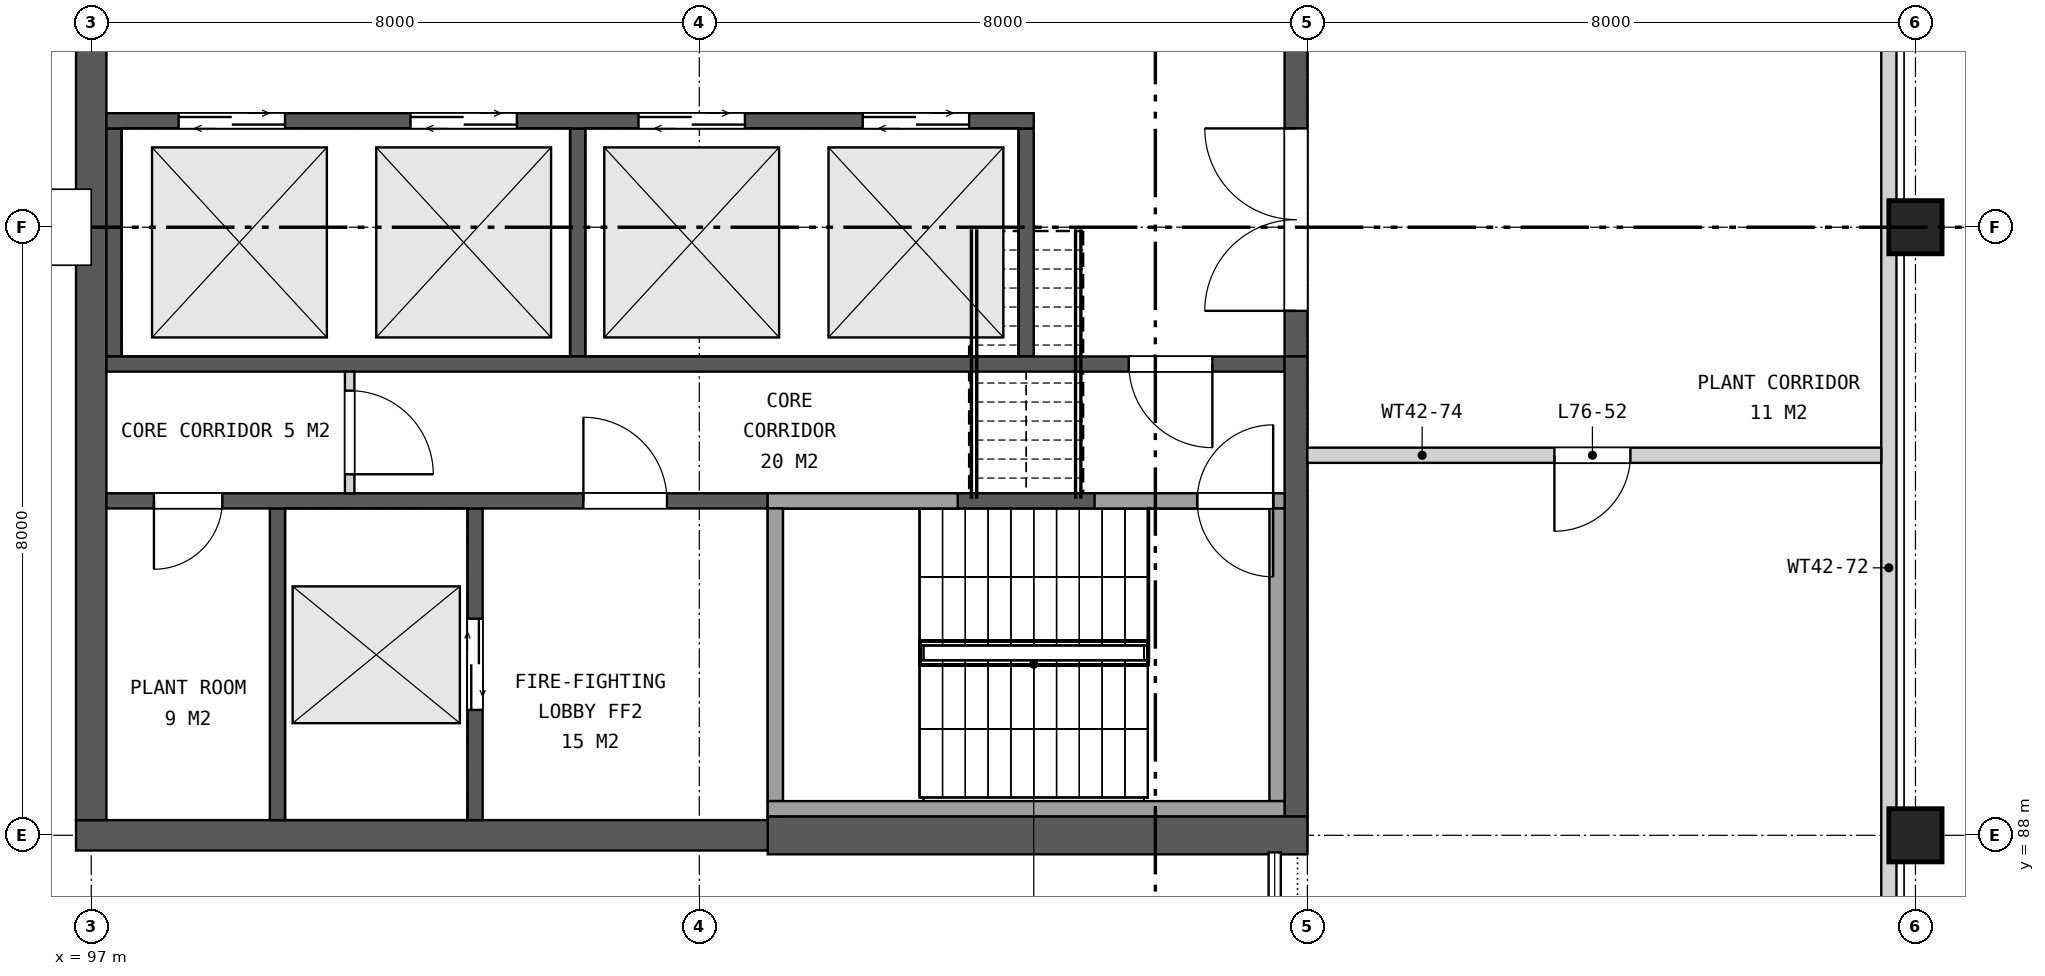
"""IFC4 building model, lengths in metres.
Left out: names, types, materials, properties, quantities, classifications, styles, units other than length and angle.
Written with IfcOpenShell. Run it as: python <this file> out.ifc"""

import sys

from ifc_helpers import new_model, si_unit, direction, frame, frame_2d, origin, origin_2d, place, context, subcontext, project, spatial, rectangle, extrude, element, fill, save


model = new_model("IFC4")
c1 = context("Model", 3, precision=1e-05, world=origin(), true_north=direction((0.0, 1.0)))
c2 = subcontext(c1, "Body", "Model", "MODEL_VIEW")
j1 = project(units=[si_unit("LENGTHUNIT", "METRE"), si_unit("PLANEANGLEUNIT", "RADIAN")], contexts=[c1])
p1 = place(None, origin())
s1 = spatial("IfcSite", under=j1, at=p1, CompositionType="ELEMENT")
p2 = place(p1, origin())
s2 = spatial("IfcBuilding", under=s1, at=p2, CompositionType="ELEMENT")
p3 = place(p2, frame((0.0, 0.0, 349.1)))
s3 = spatial("IfcBuildingStorey", under=s2, at=p3, CompositionType="ELEMENT", Elevation=349.1)
for number, where, z_axis, x_axis in (
    (1, (121.0, 88.0, 0.0), (0.0, 0.0, 1.0), (1.0, 0.0, 0.0)),
    (2, (121.0, 96.0, 0.0), (0.0, 0.0, 1.0), (1.0, 0.0, 0.0)),
):
    element("IfcColumn", number, at=place(p3, frame(where, z_axis=z_axis, x_axis=x_axis)), inside=s3, PredefinedType="COLUMN", context=c2, shape_type="SweptSolid", body=[
        extrude(rectangle(XDim=0.7, YDim=0.7, at=origin_2d()), origin(), (0.0, 0.0, 1.0), 10.23),
    ])
p4 = place(p3, frame((113.0, 88.0, 0.0), z_axis=(0.0, 0.0, 1.0), x_axis=(-1.0, 0.0, 0.0)))
e3 = element("IfcWall", 3, at=p4, inside=s3, PredefinedType="SHEAR", context=c2, shape_type="SweptSolid", body=[
    extrude(rectangle(XDim=7.1, YDim=0.5, at=frame_2d((3.55, 0.0))), origin(), (0.0, 0.0, 1.0), 12.0),
])
p5 = place(p3, frame((105.9, 88.0, 0.0), z_axis=(0.0, 0.0, 1.0), x_axis=(-1.0, 0.0, 0.0)))
e4 = element("IfcWall", 4, at=p5, inside=s3, PredefinedType="SHEAR", context=c2, shape_type="SweptSolid", body=[
    extrude(rectangle(XDim=9.1, YDim=0.4, at=frame_2d((4.55, 0.0))), origin(), (0.0, 0.0, 1.0), 12.0),
])
p6 = place(p3, frame((97.0, 111.8, 0.0), z_axis=(0.0, 0.0, 1.0), x_axis=(0.0, -1.0, 0.0)))
e5 = element("IfcWall", 5, at=p6, inside=s3, PredefinedType="SHEAR", context=c2, shape_type="SweptSolid", body=[
    extrude(rectangle(XDim=23.6, YDim=0.4, at=frame_2d((11.8, 0.0))), origin(), (0.0, 0.0, 1.0), 12.0),
])
p7 = place(p3, frame((112.85, 105.7, 0.0), z_axis=(0.0, 0.0, 1.0), x_axis=(0.0, -1.0, 0.0)))
e6 = element("IfcWall", 6, at=p7, inside=s3, PredefinedType="SHEAR", context=c2, shape_type="SweptSolid", body=[
    extrude(rectangle(XDim=11.4, YDim=0.3, at=frame_2d((5.7, 0.0))), origin(), (0.0, 0.0, 1.0), 12.0),
])
p8 = place(p7, frame((0.6, 0.0, 0.0)))
e7 = element("IfcOpeningElement", 7, at=p8, cuts=e6, PredefinedType="OPENING", context=c2, shape_type="SweptSolid", body=[
    extrude(rectangle(XDim=2.4, YDim=2.4, at=frame_2d((1.2, 1.2))), frame((0.0, 0.16, 0.0), z_axis=(0.0, -1.0, 0.0), x_axis=(1.0, 0.0, 0.0)), (0.0, 0.0, 1.0), 0.32),
])
p9 = place(p7, frame((4.5, 0.0, 0.0)))
e8 = element("IfcOpeningElement", 8, at=p9, cuts=e6, PredefinedType="OPENING", context=c2, shape_type="SweptSolid", body=[
    extrude(rectangle(XDim=2.4, YDim=2.4, at=frame_2d((1.2, 1.2))), frame((0.0, 0.16, 0.0), z_axis=(0.0, -1.0, 0.0), x_axis=(1.0, 0.0, 0.0)), (0.0, 0.0, 1.0), 0.32),
])
p10 = place(p7, frame((8.4, 0.0, 0.0)))
e9 = element("IfcOpeningElement", 9, at=p10, cuts=e6, PredefinedType="OPENING", context=c2, shape_type="SweptSolid", body=[
    extrude(rectangle(XDim=2.4, YDim=2.4, at=frame_2d((1.2, 1.2))), frame((0.0, 0.16, 0.0), z_axis=(0.0, -1.0, 0.0), x_axis=(1.0, 0.0, 0.0)), (0.0, 0.0, 1.0), 0.32),
])
for number, where, z_axis, x_axis in (
    (10, (109.3, 97.3, 0.0), (0.0, 0.0, 1.0), (0.0, -1.0, 0.0)),
    (11, (103.4, 97.3, 0.0), (0.0, 0.0, 1.0), (0.0, -1.0, 0.0)),
    (12, (97.3, 97.3, 0.0), (0.0, 0.0, 1.0), (0.0, -1.0, 0.0)),
):
    element("IfcWall", number, at=place(p3, frame(where, z_axis=z_axis, x_axis=x_axis)), inside=s3, PredefinedType="SHEAR", context=c2, shape_type="SweptSolid", body=[
        extrude(rectangle(XDim=3.0, YDim=0.2, at=frame_2d((1.5, 0.0))), origin(), (0.0, 0.0, 1.0), 9.2),
    ])
p11 = place(p3, frame((109.4, 97.4, 0.0), z_axis=(0.0, 0.0, 1.0), x_axis=(-1.0, 0.0, 0.0)))
e13 = element("IfcWall", 13, at=p11, inside=s3, PredefinedType="SHEAR", context=c2, shape_type="SweptSolid", body=[
    extrude(rectangle(XDim=12.2, YDim=0.2, at=frame_2d((6.1, 0.0))), origin(), (0.0, 0.0, 1.0), 9.2),
])
p12 = place(p11, frame((0.85, 0.0, 0.0)))
e14 = element("IfcOpeningElement", 14, at=p12, cuts=e13, PredefinedType="OPENING", context=c2, shape_type="SweptSolid", body=[
    extrude(rectangle(XDim=1.4, YDim=2.1, at=frame_2d((0.7, 1.05))), frame((0.0, 0.11, 0.0), z_axis=(0.0, -1.0, 0.0), x_axis=(1.0, 0.0, 0.0)), (0.0, 0.0, 1.0), 0.22),
])
p13 = place(p11, frame((3.8, 0.0, 0.0)))
e15 = element("IfcOpeningElement", 15, at=p13, cuts=e13, PredefinedType="OPENING", context=c2, shape_type="SweptSolid", body=[
    extrude(rectangle(XDim=1.4, YDim=2.1, at=frame_2d((0.7, 1.05))), frame((0.0, 0.11, 0.0), z_axis=(0.0, -1.0, 0.0), x_axis=(1.0, 0.0, 0.0)), (0.0, 0.0, 1.0), 0.22),
])
p14 = place(p11, frame((6.8, 0.0, 0.0)))
e16 = element("IfcOpeningElement", 16, at=p14, cuts=e13, PredefinedType="OPENING", context=c2, shape_type="SweptSolid", body=[
    extrude(rectangle(XDim=1.4, YDim=2.1, at=frame_2d((0.7, 1.05))), frame((0.0, 0.11, 0.0), z_axis=(0.0, -1.0, 0.0), x_axis=(1.0, 0.0, 0.0)), (0.0, 0.0, 1.0), 0.22),
])
p15 = place(p11, frame((9.85, 0.0, 0.0)))
e17 = element("IfcOpeningElement", 17, at=p15, cuts=e13, PredefinedType="OPENING", context=c2, shape_type="SweptSolid", body=[
    extrude(rectangle(XDim=1.4, YDim=2.1, at=frame_2d((0.7, 1.05))), frame((0.0, 0.11, 0.0), z_axis=(0.0, -1.0, 0.0), x_axis=(1.0, 0.0, 0.0)), (0.0, 0.0, 1.0), 0.22),
])
p16 = place(p3, frame((112.7, 94.2, 0.0), z_axis=(0.0, 0.0, 1.0), x_axis=(-1.0, 0.0, 0.0)))
e18 = element("IfcWall", 18, at=p16, inside=s3, PredefinedType="SHEAR", context=c2, shape_type="SweptSolid", body=[
    extrude(rectangle(XDim=15.5, YDim=0.2, at=frame_2d((7.75, 0.0))), origin(), (0.0, 0.0, 1.0), 9.2),
])
p17 = place(p16, frame((0.95, 0.0, 0.0)))
e19 = element("IfcOpeningElement", 19, at=p17, cuts=e18, PredefinedType="OPENING", context=c2, shape_type="SweptSolid", body=[
    extrude(rectangle(XDim=1.1, YDim=2.1, at=frame_2d((0.55, 1.05))), frame((0.0, 0.11, 0.0), z_axis=(0.0, -1.0, 0.0), x_axis=(1.0, 0.0, 0.0)), (0.0, 0.0, 1.0), 0.22),
])
p18 = place(p3, frame((112.85, 94.3, 0.0), z_axis=(0.0, 0.0, 1.0), x_axis=(0.0, -1.0, 0.0)))
e20 = element("IfcWall", 20, at=p18, inside=s3, PredefinedType="SHEAR", context=c2, shape_type="SweptSolid", body=[
    extrude(rectangle(XDim=6.05, YDim=0.3, at=frame_2d((3.025, 0.0))), origin(), (0.0, 0.0, 1.0), 12.0),
])
p19 = place(p3, frame((106.0, 92.3, 0.0), z_axis=(0.0, 0.0, 1.0), x_axis=(0.0, -1.0, 0.0)))
e21 = element("IfcWall", 21, at=p19, inside=s3, PredefinedType="SHEAR", context=c2, shape_type="SweptSolid", body=[
    extrude(rectangle(XDim=4.05, YDim=0.2, at=frame_2d((2.025, 0.0))), origin(), (0.0, 0.0, 1.0), 11.6),
])
p20 = place(p3, frame((102.05, 92.3, 0.0), z_axis=(0.0, 0.0, 1.0), x_axis=(0.0, -1.0, 0.0)))
e22 = element("IfcWall", 22, at=p20, inside=s3, PredefinedType="SHEAR", context=c2, shape_type="SweptSolid", body=[
    extrude(rectangle(XDim=4.1, YDim=0.2, at=frame_2d((2.05, 0.0))), origin(), (0.0, 0.0, 1.0), 9.2),
])
p21 = place(p20, frame((1.45, 0.0, 0.0)))
e23 = element("IfcOpeningElement", 23, at=p21, cuts=e22, PredefinedType="OPENING", context=c2, shape_type="SweptSolid", body=[
    extrude(rectangle(XDim=1.2, YDim=2.1, at=frame_2d((0.6, 1.05))), frame((0.0, 0.11, 0.0), z_axis=(0.0, -1.0, 0.0), x_axis=(1.0, 0.0, 0.0)), (0.0, 0.0, 1.0), 0.22),
])
p22 = place(p3, frame((99.45, 92.3, 0.0), z_axis=(0.0, 0.0, 1.0), x_axis=(0.0, -1.0, 0.0)))
e24 = element("IfcWall", 24, at=p22, inside=s3, PredefinedType="SHEAR", context=c2, shape_type="SweptSolid", body=[
    extrude(rectangle(XDim=4.1, YDim=0.2, at=frame_2d((2.05, 0.0))), origin(), (0.0, 0.0, 1.0), 9.2),
])
p23 = place(p3, frame((112.7, 92.4, 0.0), z_axis=(0.0, 0.0, 1.0), x_axis=(-1.0, 0.0, 0.0)))
e25 = element("IfcWall", 25, at=p23, inside=s3, PredefinedType="SHEAR", context=c2, shape_type="SweptSolid", body=[
    extrude(rectangle(XDim=6.8, YDim=0.2, at=frame_2d((3.4, 0.0))), origin(), (0.0, 0.0, 1.0), 11.6),
])
p24 = place(p23, frame((0.15, 0.0, 0.0)))
e26 = element("IfcOpeningElement", 26, at=p24, cuts=e25, PredefinedType="OPENING", context=c2, shape_type="SweptSolid", body=[
    extrude(rectangle(XDim=1.0, YDim=2.1, at=frame_2d((0.5, 1.05))), frame((0.0, 0.11, 0.0), z_axis=(0.0, -1.0, 0.0), x_axis=(1.0, 0.0, 0.0)), (0.0, 0.0, 1.0), 0.22),
])
p25 = place(p23, frame((0.15, 0.0, 9.2)))
e27 = element("IfcOpeningElement", 27, at=p25, cuts=e25, PredefinedType="OPENING", context=c2, shape_type="SweptSolid", body=[
    extrude(rectangle(XDim=1.0, YDim=2.1, at=frame_2d((0.5, 1.05))), frame((0.0, 0.11, 0.0), z_axis=(0.0, -1.0, 0.0), x_axis=(1.0, 0.0, 0.0)), (0.0, 0.0, 1.0), 0.22),
])
p26 = place(p3, frame((105.9, 92.4, 0.0), z_axis=(0.0, 0.0, 1.0), x_axis=(-1.0, 0.0, 0.0)))
e28 = element("IfcWall", 28, at=p26, inside=s3, PredefinedType="SHEAR", context=c2, shape_type="SweptSolid", body=[
    extrude(rectangle(XDim=8.7, YDim=0.2, at=frame_2d((4.35, 0.0))), origin(), (0.0, 0.0, 1.0), 9.2),
])
p27 = place(p26, frame((1.325, 0.0, 0.0)))
e29 = element("IfcOpeningElement", 29, at=p27, cuts=e28, PredefinedType="OPENING", context=c2, shape_type="SweptSolid", body=[
    extrude(rectangle(XDim=1.1, YDim=2.1, at=frame_2d((0.55, 1.05))), frame((0.0, 0.11, 0.0), z_axis=(0.0, -1.0, 0.0), x_axis=(1.0, 0.0, 0.0)), (0.0, 0.0, 1.0), 0.22),
])
p28 = place(p26, frame((7.175, 0.0, 0.0)))
e30 = element("IfcOpeningElement", 30, at=p28, cuts=e28, PredefinedType="OPENING", context=c2, shape_type="SweptSolid", body=[
    extrude(rectangle(XDim=0.9, YDim=2.1, at=frame_2d((0.45, 1.05))), frame((0.0, 0.11, 0.0), z_axis=(0.0, -1.0, 0.0), x_axis=(1.0, 0.0, 0.0)), (0.0, 0.0, 1.0), 0.22),
])
p29 = place(p3, frame((100.4, 94.1, 0.0), z_axis=(0.0, 0.0, 1.0), x_axis=(0.0, -1.0, 0.0)))
e31 = element("IfcWall", 31, at=p29, inside=s3, PredefinedType="PARTITIONING", context=c2, shape_type="SweptSolid", body=[
    extrude(rectangle(XDim=1.6, YDim=0.125, at=frame_2d((0.8, 0.0))), origin(), (0.0, 0.0, 1.0), 9.2),
])
p30 = place(p29, frame((0.25, 0.0, 0.0)))
e32 = element("IfcOpeningElement", 32, at=p30, cuts=e31, PredefinedType="OPENING", context=c2, shape_type="SweptSolid", body=[
    extrude(rectangle(XDim=1.1, YDim=2.1, at=frame_2d((0.55, 1.05))), frame((0.0, 0.073, 0.0), z_axis=(0.0, -1.0, 0.0), x_axis=(1.0, 0.0, 0.0)), (0.0, 0.0, 1.0), 0.145),
])
p31 = place(p3, frame((120.65, 71.73, 0.0), z_axis=(0.0, 0.0, 1.0), x_axis=(0.0, 1.0, 0.0)))
e33 = element("IfcWall", 33, at=p31, inside=s3, PredefinedType="SOLIDWALL", context=c2, shape_type="SweptSolid", body=[
    extrude(rectangle(XDim=56.54, YDim=0.2, at=frame_2d((28.27, 0.0))), origin(), (0.0, 0.0, 1.0), 11.6),
])
p32 = place(p31, frame((27.32, 0.0, 0.0)))
e34 = element("IfcOpeningElement", 34, at=p32, cuts=e33, PredefinedType="OPENING", context=c2, shape_type="SweptSolid", body=[
    extrude(rectangle(XDim=1.8, YDim=2.1, at=frame_2d((0.9, 1.05))), frame((0.0, 0.11, 0.0), z_axis=(0.0, -1.0, 0.0), x_axis=(1.0, 0.0, 0.0)), (0.0, 0.0, 1.0), 0.22),
])
p33 = place(p3, frame((113.0, 93.0, 0.0), z_axis=(0.0, 0.0, 1.0), x_axis=(1.0, 0.0, 0.0)))
e35 = element("IfcWall", 35, at=p33, inside=s3, PredefinedType="SOLIDWALL", context=c2, shape_type="SweptSolid", body=[
    extrude(rectangle(XDim=7.55, YDim=0.2, at=frame_2d((3.775, 0.0))), origin(), (0.0, 0.0, 1.0), 11.6),
])
p34 = place(p33, frame((3.25, 0.0, 0.0)))
e36 = element("IfcOpeningElement", 36, at=p34, cuts=e35, PredefinedType="OPENING", context=c2, shape_type="SweptSolid", body=[
    extrude(rectangle(XDim=1.0, YDim=2.1, at=frame_2d((0.5, 1.05))), frame((0.0, 0.11, 0.0), z_axis=(0.0, -1.0, 0.0), x_axis=(1.0, 0.0, 0.0)), (0.0, 0.0, 1.0), 0.22),
])
p35 = place(p10, frame((2.4, 0.0, 0.0), z_axis=(0.0, 0.0, 1.0), x_axis=(-1.0, 0.0, 0.0)))
e37 = element("IfcDoor", 37, at=p35, inside=s3, OperationType="DOUBLE_DOOR_SINGLE_SWING", PredefinedType="DOOR", context=c2, shape_type="SweptSolid", body=[
    extrude(rectangle(XDim=2.4, YDim=2.4, at=frame_2d((1.2, 1.2))), frame((0.0, 0.025, 0.0), z_axis=(0.0, -1.0, 0.0), x_axis=(1.0, 0.0, 0.0)), (0.0, 0.0, 1.0), 0.05),
])
fill(e9, e37)
p36 = place(p12, origin())
e38 = element("IfcDoor", 38, at=p36, inside=s3, OperationType="DOUBLE_DOOR_SLIDING", PredefinedType="DOOR", context=c2, shape_type="SweptSolid", body=[
    extrude(rectangle(XDim=1.4, YDim=2.1, at=frame_2d((0.7, 1.05))), frame((0.0, 0.025, 0.0), z_axis=(0.0, -1.0, 0.0), x_axis=(1.0, 0.0, 0.0)), (0.0, 0.0, 1.0), 0.05),
])
fill(e14, e38)
p37 = place(p13, origin())
e39 = element("IfcDoor", 39, at=p37, inside=s3, OperationType="DOUBLE_DOOR_SLIDING", PredefinedType="DOOR", context=c2, shape_type="SweptSolid", body=[
    extrude(rectangle(XDim=1.4, YDim=2.1, at=frame_2d((0.7, 1.05))), frame((0.0, 0.025, 0.0), z_axis=(0.0, -1.0, 0.0), x_axis=(1.0, 0.0, 0.0)), (0.0, 0.0, 1.0), 0.05),
])
fill(e15, e39)
p38 = place(p14, origin())
e40 = element("IfcDoor", 40, at=p38, inside=s3, OperationType="DOUBLE_DOOR_SLIDING", PredefinedType="DOOR", context=c2, shape_type="SweptSolid", body=[
    extrude(rectangle(XDim=1.4, YDim=2.1, at=frame_2d((0.7, 1.05))), frame((0.0, 0.025, 0.0), z_axis=(0.0, -1.0, 0.0), x_axis=(1.0, 0.0, 0.0)), (0.0, 0.0, 1.0), 0.05),
])
fill(e16, e40)
p39 = place(p15, origin())
e41 = element("IfcDoor", 41, at=p39, inside=s3, OperationType="DOUBLE_DOOR_SLIDING", PredefinedType="DOOR", context=c2, shape_type="SweptSolid", body=[
    extrude(rectangle(XDim=1.4, YDim=2.1, at=frame_2d((0.7, 1.05))), frame((0.0, 0.025, 0.0), z_axis=(0.0, -1.0, 0.0), x_axis=(1.0, 0.0, 0.0)), (0.0, 0.0, 1.0), 0.05),
])
fill(e17, e41)
p40 = place(p17, origin())
e42 = element("IfcDoor", 42, at=p40, inside=s3, OperationType="SINGLE_SWING_LEFT", PredefinedType="DOOR", context=c2, shape_type="SweptSolid", body=[
    extrude(rectangle(XDim=1.1, YDim=2.1, at=frame_2d((0.55, 1.05))), frame((0.0, 0.025, 0.0), z_axis=(0.0, -1.0, 0.0), x_axis=(1.0, 0.0, 0.0)), (0.0, 0.0, 1.0), 0.05),
])
fill(e19, e42)
p41 = place(p21, origin())
e43 = element("IfcDoor", 43, at=p41, inside=s3, OperationType="DOUBLE_DOOR_SLIDING", PredefinedType="DOOR", context=c2, shape_type="SweptSolid", body=[
    extrude(rectangle(XDim=1.2, YDim=2.1, at=frame_2d((0.6, 1.05))), frame((0.0, 0.025, 0.0), z_axis=(0.0, -1.0, 0.0), x_axis=(1.0, 0.0, 0.0)), (0.0, 0.0, 1.0), 0.05),
])
fill(e23, e43)
p42 = place(p24, origin())
e44 = element("IfcDoor", 44, at=p42, inside=s3, OperationType="SINGLE_SWING_LEFT", PredefinedType="DOOR", context=c2, shape_type="SweptSolid", body=[
    extrude(rectangle(XDim=1.0, YDim=2.1, at=frame_2d((0.5, 1.05))), frame((0.0, 0.025, 0.0), z_axis=(0.0, -1.0, 0.0), x_axis=(1.0, 0.0, 0.0)), (0.0, 0.0, 1.0), 0.05),
])
fill(e26, e44)
p43 = place(p25, frame((1.0, 0.0, 0.0), z_axis=(0.0, 0.0, 1.0), x_axis=(-1.0, 0.0, 0.0)))
e45 = element("IfcDoor", 45, at=p43, inside=s3, OperationType="SINGLE_SWING_RIGHT", PredefinedType="DOOR", context=c2, shape_type="SweptSolid", body=[
    extrude(rectangle(XDim=1.0, YDim=2.1, at=frame_2d((0.5, 1.05))), frame((0.0, 0.025, 0.0), z_axis=(0.0, -1.0, 0.0), x_axis=(1.0, 0.0, 0.0)), (0.0, 0.0, 1.0), 0.05),
])
fill(e27, e45)
p44 = place(p27, frame((1.1, 0.0, 0.0), z_axis=(0.0, 0.0, 1.0), x_axis=(-1.0, 0.0, 0.0)))
e46 = element("IfcDoor", 46, at=p44, inside=s3, OperationType="SINGLE_SWING_LEFT", PredefinedType="DOOR", context=c2, shape_type="SweptSolid", body=[
    extrude(rectangle(XDim=1.1, YDim=2.1, at=frame_2d((0.55, 1.05))), frame((0.0, 0.025, 0.0), z_axis=(0.0, -1.0, 0.0), x_axis=(1.0, 0.0, 0.0)), (0.0, 0.0, 1.0), 0.05),
])
fill(e29, e46)
p45 = place(p28, origin())
e47 = element("IfcDoor", 47, at=p45, inside=s3, OperationType="SINGLE_SWING_RIGHT", PredefinedType="DOOR", context=c2, shape_type="SweptSolid", body=[
    extrude(rectangle(XDim=0.9, YDim=2.1, at=frame_2d((0.45, 1.05))), frame((0.0, 0.025, 0.0), z_axis=(0.0, -1.0, 0.0), x_axis=(1.0, 0.0, 0.0)), (0.0, 0.0, 1.0), 0.05),
])
fill(e30, e47)
p46 = place(p30, origin())
e48 = element("IfcDoor", 48, at=p46, inside=s3, OperationType="SINGLE_SWING_RIGHT", PredefinedType="DOOR", context=c2, shape_type="SweptSolid", body=[
    extrude(rectangle(XDim=1.1, YDim=2.1, at=frame_2d((0.55, 1.05))), frame((0.0, 0.025, 0.0), z_axis=(0.0, -1.0, 0.0), x_axis=(1.0, 0.0, 0.0)), (0.0, 0.0, 1.0), 0.05),
])
fill(e32, e48)
p47 = place(p34, frame((1.0, 0.0, 0.0), z_axis=(0.0, 0.0, 1.0), x_axis=(-1.0, 0.0, 0.0)))
e49 = element("IfcDoor", 49, at=p47, inside=s3, OperationType="SINGLE_SWING_RIGHT", PredefinedType="DOOR", context=c2, shape_type="SweptSolid", body=[
    extrude(rectangle(XDim=1.0, YDim=2.1, at=frame_2d((0.5, 1.05))), frame((0.0, 0.025, 0.0), z_axis=(0.0, -1.0, 0.0), x_axis=(1.0, 0.0, 0.0)), (0.0, 0.0, 1.0), 0.05),
])
fill(e36, e49)
save(model, sys.argv[1])
